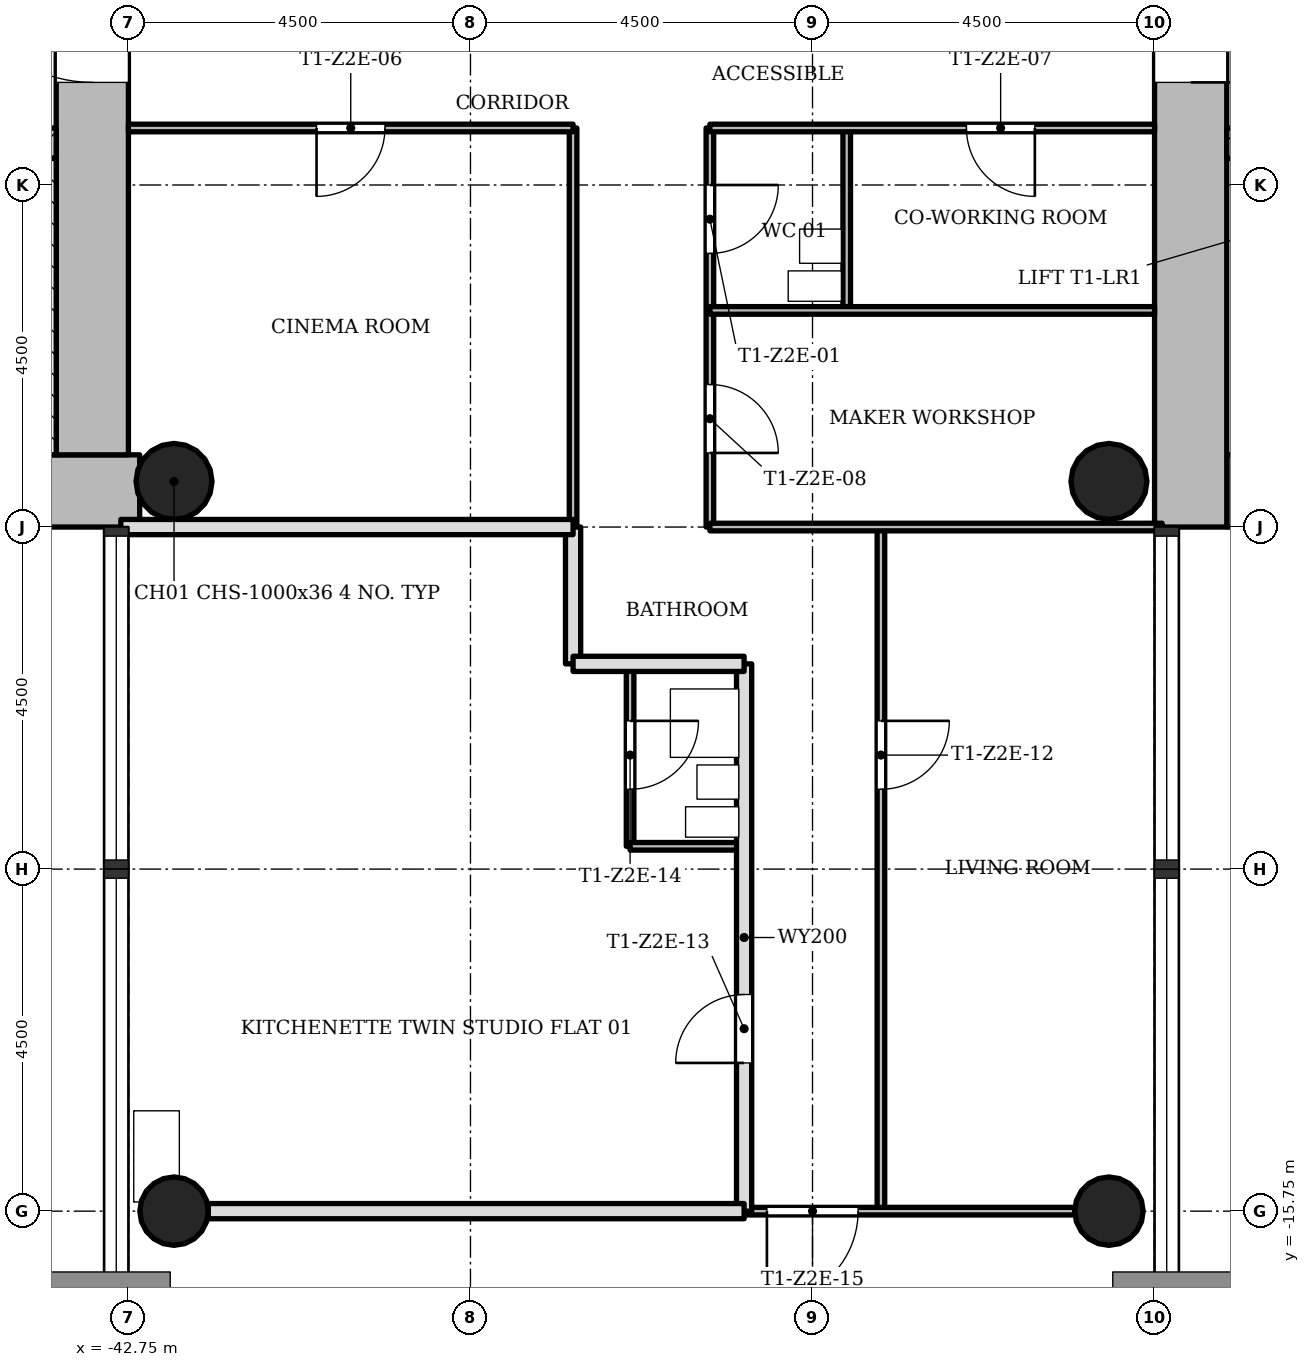
"""IFC4 building model, lengths in metres.
Left out: names, types, materials, properties, quantities, classifications, styles, units other than length and angle.
Written with IfcOpenShell. Run it as: python <this file> out.ifc"""

import sys

from ifc_helpers import new_model, si_unit, direction, frame, frame_2d, origin, origin_2d, place, context, subcontext, project, spatial, rectangle, hollow_circle, extrude, element, fill, save


model = new_model("IFC4")
c1 = context("Model", 3, precision=1e-05, world=origin(), true_north=direction((0.0, 1.0)))
c2 = subcontext(c1, "Body", "Model", "MODEL_VIEW")
j1 = project(units=[si_unit("LENGTHUNIT", "METRE"), si_unit("PLANEANGLEUNIT", "RADIAN")], contexts=[c1])
p1 = place(None, origin())
s1 = spatial("IfcSite", under=j1, at=p1, CompositionType="ELEMENT")
p2 = place(p1, origin())
s2 = spatial("IfcBuilding", under=s1, at=p2, CompositionType="ELEMENT")
p3 = place(p2, frame((0.0, 0.0, 100.4)))
s3 = spatial("IfcBuildingStorey", under=s2, at=p3, CompositionType="ELEMENT", Elevation=100.4)
p4 = place(p3, frame((-28.3, -6.275, 0.0), z_axis=(0.0, 0.0, 1.0), x_axis=(1.0, 0.0, 0.0)))
e1 = element("IfcWall", 1, at=p4, inside=s3, PredefinedType="SHEAR", context=c2, shape_type="SweptSolid", body=[
    extrude(rectangle(XDim=8.05, YDim=0.95, at=frame_2d((4.025, 0.0))), origin(), (0.0, 0.0, 1.0), 3.4),
])
p5 = place(p3, frame((-28.775, 5.8, 0.0), z_axis=(0.0, 0.0, 1.0), x_axis=(0.0, -1.0, 0.0)))
e2 = element("IfcWall", 2, at=p5, inside=s3, PredefinedType="SHEAR", context=c2, shape_type="SweptSolid", body=[
    extrude(rectangle(XDim=12.55, YDim=0.95, at=frame_2d((6.275, 0.0))), origin(), (0.0, 0.0, 1.0), 3.4),
])
p6 = place(p5, frame((4.9, 0.0, 0.0)))
e3 = element("IfcOpeningElement", 3, at=p6, cuts=e2, PredefinedType="OPENING", context=c2, shape_type="SweptSolid", body=[
    extrude(rectangle(XDim=1.8, YDim=2.1, at=frame_2d((0.9, 1.05))), frame((0.0, 0.485, 0.0), z_axis=(0.0, -1.0, 0.0), x_axis=(1.0, 0.0, 0.0)), (0.0, 0.0, 1.0), 0.97),
])
p7 = place(p3, frame((-28.3, -1.7, 0.0), z_axis=(0.0, 0.0, 1.0), x_axis=(1.0, 0.0, 0.0)))
e4 = element("IfcWall", 4, at=p7, inside=s3, PredefinedType="SHEAR", context=c2, shape_type="SweptSolid", body=[
    extrude(rectangle(XDim=7.1, YDim=0.4, at=frame_2d((3.55, 0.0))), origin(), (0.0, 0.0, 1.0), 3.4),
])
p8 = place(p7, frame((0.8, 0.0, 0.0)))
e5 = element("IfcOpeningElement", 5, at=p8, cuts=e4, PredefinedType="OPENING", context=c2, shape_type="SweptSolid", body=[
    extrude(rectangle(XDim=1.1, YDim=2.1, at=frame_2d((0.55, 1.05))), frame((0.0, 0.21, 0.0), z_axis=(0.0, -1.0, 0.0), x_axis=(1.0, 0.0, 0.0)), (0.0, 0.0, 1.0), 0.42),
])
p9 = place(p7, frame((3.0, 0.0, 0.0)))
e6 = element("IfcOpeningElement", 6, at=p9, cuts=e4, PredefinedType="OPENING", context=c2, shape_type="SweptSolid", body=[
    extrude(rectangle(XDim=1.1, YDim=2.1, at=frame_2d((0.55, 1.05))), frame((0.0, 0.21, 0.0), z_axis=(0.0, -1.0, 0.0), x_axis=(1.0, 0.0, 0.0)), (0.0, 0.0, 1.0), 0.42),
])
p10 = place(p7, frame((5.2, 0.0, 0.0)))
e7 = element("IfcOpeningElement", 7, at=p10, cuts=e4, PredefinedType="OPENING", context=c2, shape_type="SweptSolid", body=[
    extrude(rectangle(XDim=1.1, YDim=2.1, at=frame_2d((0.55, 1.05))), frame((0.0, 0.21, 0.0), z_axis=(0.0, -1.0, 0.0), x_axis=(1.0, 0.0, 0.0)), (0.0, 0.0, 1.0), 0.42),
])
p11 = place(p3, frame((-51.298, -6.275, 0.0), z_axis=(0.0, 0.0, 1.0), x_axis=(1.0, 0.0, 0.0)))
e8 = element("IfcWall", 8, at=p11, inside=s3, PredefinedType="SHEAR", context=c2, shape_type="SweptSolid", body=[
    extrude(rectangle(XDim=8.696, YDim=0.95, at=frame_2d((4.348, 0.0))), origin(), (0.0, 0.0, 1.0), 3.4),
])
p12 = place(p3, frame((-43.225, -5.8, 0.0), z_axis=(0.0, 0.0, 1.0), x_axis=(0.0, 1.0, 0.0)))
e9 = element("IfcWall", 9, at=p12, inside=s3, PredefinedType="SHEAR", context=c2, shape_type="SweptSolid", body=[
    extrude(rectangle(XDim=12.55, YDim=0.95, at=frame_2d((6.275, 0.0))), origin(), (0.0, 0.0, 1.0), 3.4),
])
p13 = place(p12, frame((4.9, 0.0, 0.0)))
e10 = element("IfcOpeningElement", 10, at=p13, cuts=e9, PredefinedType="OPENING", context=c2, shape_type="SweptSolid", body=[
    extrude(rectangle(XDim=1.8, YDim=2.1, at=frame_2d((0.9, 1.05))), frame((0.0, 0.485, 0.0), z_axis=(0.0, -1.0, 0.0), x_axis=(1.0, 0.0, 0.0)), (0.0, 0.0, 1.0), 0.97),
])
p14 = place(p3, frame((-50.8, -1.7, 0.0), z_axis=(0.0, 0.0, 1.0), x_axis=(1.0, 0.0, 0.0)))
e11 = element("IfcWall", 11, at=p14, inside=s3, PredefinedType="SHEAR", context=c2, shape_type="SweptSolid", body=[
    extrude(rectangle(XDim=7.1, YDim=0.4, at=frame_2d((3.55, 0.0))), origin(), (0.0, 0.0, 1.0), 3.4),
])
p15 = place(p14, frame((5.5, 0.0, 0.0)))
e12 = element("IfcOpeningElement", 12, at=p15, cuts=e11, PredefinedType="OPENING", context=c2, shape_type="SweptSolid", body=[
    extrude(rectangle(XDim=0.9, YDim=2.1, at=frame_2d((0.45, 1.05))), frame((0.0, 0.21, 0.0), z_axis=(0.0, -1.0, 0.0), x_axis=(1.0, 0.0, 0.0)), (0.0, 0.0, 1.0), 0.42),
])
for number, where, z_axis, x_axis in (
    (13, (-42.15, -15.75, 0.0), (0.0, 0.0, 1.0), (1.0, 0.0, 0.0)),
    (14, (-29.85, -15.75, 0.0), (0.0, 0.0, 1.0), (1.0, 0.0, 0.0)),
):
    element("IfcColumn", number, at=place(p3, frame(where, z_axis=z_axis, x_axis=x_axis)), inside=s3, PredefinedType="COLUMN", context=c2, shape_type="SweptSolid", body=[
        extrude(hollow_circle(Radius=0.45, WallThickness=0.032, at=origin_2d()), origin(), (0.0, 0.0, 1.0), 3.4),
    ])
for number, where, z_axis, x_axis in (
    (15, (-42.15, -6.15, 0.0), (0.0, 0.0, 1.0), (1.0, 0.0, 0.0)),
    (16, (-29.85, -6.15, 0.0), (0.0, 0.0, 1.0), (1.0, 0.0, 0.0)),
):
    element("IfcColumn", number, at=place(p3, frame(where, z_axis=z_axis, x_axis=x_axis)), inside=s3, PredefinedType="COLUMN", context=c2, shape_type="SweptSolid", body=[
        extrude(hollow_circle(Radius=0.5, WallThickness=0.036, at=origin_2d()), origin(), (0.0, 0.0, 1.0), 3.4),
    ])
p16 = place(p3, frame((-36.9, -6.75, 0.0), z_axis=(0.0, 0.0, 1.0), x_axis=(0.0, 1.0, 0.0)))
e17 = element("IfcWall", 17, at=p16, inside=s3, PredefinedType="PARTITIONING", context=c2, shape_type="SweptSolid", body=[
    extrude(rectangle(XDim=5.25, YDim=0.1, at=frame_2d((2.625, 0.0))), origin(), (0.0, 0.0, 1.0), 3.0),
])
p17 = place(p3, frame((-36.9, -8.55, 0.0), z_axis=(0.0, 0.0, 1.0), x_axis=(0.0, 1.0, 0.0)))
e18 = element("IfcWall", 18, at=p17, inside=s3, PredefinedType="SOLIDWALL", context=c2, shape_type="SweptSolid", body=[
    extrude(rectangle(XDim=1.8, YDim=0.2, at=frame_2d((0.9, 0.0))), origin(), (0.0, 0.0, 1.0), 3.0),
])
p18 = place(p3, frame((-36.15, -10.95, 0.0), z_axis=(0.0, 0.0, 1.0), x_axis=(0.0, 1.0, 0.0)))
e19 = element("IfcWall", 19, at=p18, inside=s3, PredefinedType="PARTITIONING", context=c2, shape_type="SweptSolid", body=[
    extrude(rectangle(XDim=2.4, YDim=0.1, at=frame_2d((1.2, 0.0))), origin(), (0.0, 0.0, 1.0), 3.0),
])
p19 = place(p18, frame((0.75, 0.0, 0.0)))
e20 = element("IfcOpeningElement", 20, at=p19, cuts=e19, PredefinedType="OPENING", context=c2, shape_type="SweptSolid", body=[
    extrude(rectangle(XDim=0.9, YDim=2.1, at=frame_2d((0.45, 1.05))), frame((0.0, 0.06, 0.0), z_axis=(0.0, -1.0, 0.0), x_axis=(1.0, 0.0, 0.0)), (0.0, 0.0, 1.0), 0.12),
])
p20 = place(p3, frame((-35.1, -6.75, 0.0), z_axis=(0.0, 0.0, 1.0), x_axis=(0.0, 1.0, 0.0)))
e21 = element("IfcWall", 21, at=p20, inside=s3, PredefinedType="PARTITIONING", context=c2, shape_type="SweptSolid", body=[
    extrude(rectangle(XDim=5.25, YDim=0.1, at=frame_2d((2.625, 0.0))), origin(), (0.0, 0.0, 1.0), 3.0),
])
p21 = place(p20, frame((3.6, 0.0, 0.0)))
e22 = element("IfcOpeningElement", 22, at=p21, cuts=e21, PredefinedType="OPENING", context=c2, shape_type="SweptSolid", body=[
    extrude(rectangle(XDim=0.9, YDim=2.1, at=frame_2d((0.45, 1.05))), frame((0.0, 0.06, 0.0), z_axis=(0.0, -1.0, 0.0), x_axis=(1.0, 0.0, 0.0)), (0.0, 0.0, 1.0), 0.12),
])
p22 = place(p20, frame((0.975, 0.0, 0.0)))
e23 = element("IfcOpeningElement", 23, at=p22, cuts=e21, PredefinedType="OPENING", context=c2, shape_type="SweptSolid", body=[
    extrude(rectangle(XDim=0.9, YDim=2.1, at=frame_2d((0.45, 1.05))), frame((0.0, 0.06, 0.0), z_axis=(0.0, -1.0, 0.0), x_axis=(1.0, 0.0, 0.0)), (0.0, 0.0, 1.0), 0.12),
])
p23 = place(p3, frame((-34.65, -15.75, 0.0), z_axis=(0.0, 0.0, 1.0), x_axis=(0.0, 1.0, 0.0)))
e24 = element("IfcWall", 24, at=p23, inside=s3, PredefinedType="SOLIDWALL", context=c2, shape_type="SweptSolid", body=[
    extrude(rectangle(XDim=7.2, YDim=0.2, at=frame_2d((3.6, 0.0))), origin(), (0.0, 0.0, 1.0), 3.0),
])
p24 = place(p23, frame((1.95, 0.0, 0.0)))
e25 = element("IfcOpeningElement", 25, at=p24, cuts=e24, PredefinedType="OPENING", context=c2, shape_type="SweptSolid", body=[
    extrude(rectangle(XDim=0.9, YDim=2.1, at=frame_2d((0.45, 1.05))), frame((0.0, 0.11, 0.0), z_axis=(0.0, -1.0, 0.0), x_axis=(1.0, 0.0, 0.0)), (0.0, 0.0, 1.0), 0.22),
])
p25 = place(p3, frame((-33.3, -3.9, 0.0), z_axis=(0.0, 0.0, 1.0), x_axis=(0.0, 1.0, 0.0)))
e26 = element("IfcWall", 26, at=p25, inside=s3, PredefinedType="PARTITIONING", context=c2, shape_type="SweptSolid", body=[
    extrude(rectangle(XDim=2.4, YDim=0.1, at=frame_2d((1.2, 0.0))), origin(), (0.0, 0.0, 1.0), 3.0),
])
p26 = place(p3, frame((-32.85, -15.75, 0.0), z_axis=(0.0, 0.0, 1.0), x_axis=(0.0, 1.0, 0.0)))
e27 = element("IfcWall", 27, at=p26, inside=s3, PredefinedType="PARTITIONING", context=c2, shape_type="SweptSolid", body=[
    extrude(rectangle(XDim=9.0, YDim=0.1, at=frame_2d((4.5, 0.0))), origin(), (0.0, 0.0, 1.0), 3.0),
])
p27 = place(p26, frame((5.55, 0.0, 0.0)))
e28 = element("IfcOpeningElement", 28, at=p27, cuts=e27, PredefinedType="OPENING", context=c2, shape_type="SweptSolid", body=[
    extrude(rectangle(XDim=0.9, YDim=2.1, at=frame_2d((0.45, 1.05))), frame((0.0, 0.06, 0.0), z_axis=(0.0, -1.0, 0.0), x_axis=(1.0, 0.0, 0.0)), (0.0, 0.0, 1.0), 0.12),
])
p28 = place(p3, frame((-34.65, -15.75, 0.0), z_axis=(0.0, 0.0, 1.0), x_axis=(1.0, 0.0, 0.0)))
e29 = element("IfcWall", 29, at=p28, inside=s3, PredefinedType="PARTITIONING", context=c2, shape_type="SweptSolid", body=[
    extrude(rectangle(XDim=4.35, YDim=0.1, at=frame_2d((2.175, 0.0))), origin(), (0.0, 0.0, 1.0), 3.0),
])
p29 = place(p28, frame((0.3, 0.0, 0.0)))
e30 = element("IfcOpeningElement", 30, at=p29, cuts=e29, PredefinedType="OPENING", context=c2, shape_type="SweptSolid", body=[
    extrude(rectangle(XDim=1.2, YDim=2.1, at=frame_2d((0.6, 1.05))), frame((0.0, 0.06, 0.0), z_axis=(0.0, -1.0, 0.0), x_axis=(1.0, 0.0, 0.0)), (0.0, 0.0, 1.0), 0.12),
])
p30 = place(p3, frame((-41.7, -15.75, 0.0), z_axis=(0.0, 0.0, 1.0), x_axis=(1.0, 0.0, 0.0)))
e31 = element("IfcWall", 31, at=p30, inside=s3, PredefinedType="SOLIDWALL", context=c2, shape_type="SweptSolid", body=[
    extrude(rectangle(XDim=7.05, YDim=0.2, at=frame_2d((3.525, 0.0))), origin(), (0.0, 0.0, 1.0), 3.0),
])
p31 = place(p3, frame((-36.15, -10.95, 0.0), z_axis=(0.0, 0.0, 1.0), x_axis=(1.0, 0.0, 0.0)))
e32 = element("IfcWall", 32, at=p31, inside=s3, PredefinedType="PARTITIONING", context=c2, shape_type="SweptSolid", body=[
    extrude(rectangle(XDim=1.5, YDim=0.1, at=frame_2d((0.75, 0.0))), origin(), (0.0, 0.0, 1.0), 3.0),
])
p32 = place(p3, frame((-36.9, -8.55, 0.0), z_axis=(0.0, 0.0, 1.0), x_axis=(1.0, 0.0, 0.0)))
e33 = element("IfcWall", 33, at=p32, inside=s3, PredefinedType="SOLIDWALL", context=c2, shape_type="SweptSolid", body=[
    extrude(rectangle(XDim=2.25, YDim=0.2, at=frame_2d((1.125, 0.0))), origin(), (0.0, 0.0, 1.0), 3.0),
])
p33 = place(p3, frame((-35.1, -6.75, 0.0), z_axis=(0.0, 0.0, 1.0), x_axis=(1.0, 0.0, 0.0)))
e34 = element("IfcWall", 34, at=p33, inside=s3, PredefinedType="PARTITIONING", context=c2, shape_type="SweptSolid", body=[
    extrude(rectangle(XDim=5.95, YDim=0.1, at=frame_2d((2.975, 0.0))), origin(), (0.0, 0.0, 1.0), 3.0),
])
p34 = place(p3, frame((-42.85, -6.75, 0.0), z_axis=(0.0, 0.0, 1.0), x_axis=(1.0, 0.0, 0.0)))
e35 = element("IfcWall", 35, at=p34, inside=s3, PredefinedType="SOLIDWALL", context=c2, shape_type="SweptSolid", body=[
    extrude(rectangle(XDim=5.95, YDim=0.2, at=frame_2d((2.975, 0.0))), origin(), (0.0, 0.0, 1.0), 3.0),
])
p35 = place(p3, frame((-35.1, -3.9, 0.0), z_axis=(0.0, 0.0, 1.0), x_axis=(1.0, 0.0, 0.0)))
e36 = element("IfcWall", 36, at=p35, inside=s3, PredefinedType="PARTITIONING", context=c2, shape_type="SweptSolid", body=[
    extrude(rectangle(XDim=5.85, YDim=0.1, at=frame_2d((2.925, 0.0))), origin(), (0.0, 0.0, 1.0), 3.0),
])
p36 = place(p3, frame((-42.75, -1.5, 0.0), z_axis=(0.0, 0.0, 1.0), x_axis=(1.0, 0.0, 0.0)))
e37 = element("IfcWall", 37, at=p36, inside=s3, PredefinedType="PARTITIONING", context=c2, shape_type="SweptSolid", body=[
    extrude(rectangle(XDim=5.85, YDim=0.1, at=frame_2d((2.925, 0.0))), origin(), (0.0, 0.0, 1.0), 3.0),
])
p37 = place(p36, frame((2.475, 0.0, 0.0)))
e38 = element("IfcOpeningElement", 38, at=p37, cuts=e37, PredefinedType="OPENING", context=c2, shape_type="SweptSolid", body=[
    extrude(rectangle(XDim=0.9, YDim=2.1, at=frame_2d((0.45, 1.05))), frame((0.0, 0.06, 0.0), z_axis=(0.0, -1.0, 0.0), x_axis=(1.0, 0.0, 0.0)), (0.0, 0.0, 1.0), 0.12),
])
p38 = place(p3, frame((-35.1, -1.5, 0.0), z_axis=(0.0, 0.0, 1.0), x_axis=(1.0, 0.0, 0.0)))
e39 = element("IfcWall", 39, at=p38, inside=s3, PredefinedType="PARTITIONING", context=c2, shape_type="SweptSolid", body=[
    extrude(rectangle(XDim=5.85, YDim=0.1, at=frame_2d((2.925, 0.0))), origin(), (0.0, 0.0, 1.0), 3.0),
])
p39 = place(p38, frame((3.375, 0.0, 0.0)))
e40 = element("IfcOpeningElement", 40, at=p39, cuts=e39, PredefinedType="OPENING", context=c2, shape_type="SweptSolid", body=[
    extrude(rectangle(XDim=0.9, YDim=2.1, at=frame_2d((0.45, 1.05))), frame((0.0, 0.06, 0.0), z_axis=(0.0, -1.0, 0.0), x_axis=(1.0, 0.0, 0.0)), (0.0, 0.0, 1.0), 0.12),
])
p40 = place(p3, frame((-43.825, -1.9, 0.0), z_axis=(0.0, 0.0, 1.0), x_axis=(0.0, -1.0, 0.0)))
e41 = element("IfcWall", 41, at=p40, inside=s3, PredefinedType="SHEAR", context=c2, shape_type="SweptSolid", body=[
    extrude(rectangle(XDim=3.9, YDim=0.25, at=frame_2d((1.95, 0.0))), origin(), (0.0, 0.0, 1.0), 3.4),
])
p41 = place(p21, origin())
e42 = element("IfcDoor", 42, at=p41, inside=s3, OperationType="SINGLE_SWING_RIGHT", PredefinedType="DOOR", context=c2, shape_type="SweptSolid", body=[
    extrude(rectangle(XDim=0.9, YDim=2.1, at=frame_2d((0.45, 1.05))), frame((0.0, 0.025, 0.0), z_axis=(0.0, -1.0, 0.0), x_axis=(1.0, 0.0, 0.0)), (0.0, 0.0, 1.0), 0.05),
])
fill(e22, e42)
p42 = place(p37, origin())
e43 = element("IfcDoor", 43, at=p42, inside=s3, OperationType="SINGLE_SWING_LEFT", PredefinedType="DOOR", context=c2, shape_type="SweptSolid", body=[
    extrude(rectangle(XDim=0.9, YDim=2.1, at=frame_2d((0.45, 1.05))), frame((0.0, 0.025, 0.0), z_axis=(0.0, -1.0, 0.0), x_axis=(1.0, 0.0, 0.0)), (0.0, 0.0, 1.0), 0.05),
])
fill(e38, e43)
p43 = place(p39, origin())
e44 = element("IfcDoor", 44, at=p43, inside=s3, OperationType="SINGLE_SWING_RIGHT", PredefinedType="DOOR", context=c2, shape_type="SweptSolid", body=[
    extrude(rectangle(XDim=0.9, YDim=2.1, at=frame_2d((0.45, 1.05))), frame((0.0, 0.025, 0.0), z_axis=(0.0, -1.0, 0.0), x_axis=(1.0, 0.0, 0.0)), (0.0, 0.0, 1.0), 0.05),
])
fill(e40, e44)
p44 = place(p22, origin())
e45 = element("IfcDoor", 45, at=p44, inside=s3, OperationType="SINGLE_SWING_LEFT", PredefinedType="DOOR", context=c2, shape_type="SweptSolid", body=[
    extrude(rectangle(XDim=0.9, YDim=2.1, at=frame_2d((0.45, 1.05))), frame((0.0, 0.025, 0.0), z_axis=(0.0, -1.0, 0.0), x_axis=(1.0, 0.0, 0.0)), (0.0, 0.0, 1.0), 0.05),
])
fill(e23, e45)
p45 = place(p27, origin())
e46 = element("IfcDoor", 46, at=p45, inside=s3, OperationType="SINGLE_SWING_RIGHT", PredefinedType="DOOR", context=c2, shape_type="SweptSolid", body=[
    extrude(rectangle(XDim=0.9, YDim=2.1, at=frame_2d((0.45, 1.05))), frame((0.0, 0.025, 0.0), z_axis=(0.0, -1.0, 0.0), x_axis=(1.0, 0.0, 0.0)), (0.0, 0.0, 1.0), 0.05),
])
fill(e28, e46)
p46 = place(p24, origin())
e47 = element("IfcDoor", 47, at=p46, inside=s3, OperationType="SINGLE_SWING_RIGHT", PredefinedType="DOOR", context=c2, shape_type="SweptSolid", body=[
    extrude(rectangle(XDim=0.9, YDim=2.1, at=frame_2d((0.45, 1.05))), frame((0.0, 0.025, 0.0), z_axis=(0.0, -1.0, 0.0), x_axis=(1.0, 0.0, 0.0)), (0.0, 0.0, 1.0), 0.05),
])
fill(e25, e47)
p47 = place(p19, origin())
e48 = element("IfcDoor", 48, at=p47, inside=s3, OperationType="SINGLE_SWING_RIGHT", PredefinedType="DOOR", context=c2, shape_type="SweptSolid", body=[
    extrude(rectangle(XDim=0.9, YDim=2.1, at=frame_2d((0.45, 1.05))), frame((0.0, 0.025, 0.0), z_axis=(0.0, -1.0, 0.0), x_axis=(1.0, 0.0, 0.0)), (0.0, 0.0, 1.0), 0.05),
])
fill(e20, e48)
p48 = place(p29, origin())
e49 = element("IfcDoor", 49, at=p48, inside=s3, OperationType="SINGLE_SWING_LEFT", PredefinedType="DOOR", context=c2, shape_type="SweptSolid", body=[
    extrude(rectangle(XDim=1.2, YDim=2.1, at=frame_2d((0.6, 1.05))), frame((0.0, 0.025, 0.0), z_axis=(0.0, -1.0, 0.0), x_axis=(1.0, 0.0, 0.0)), (0.0, 0.0, 1.0), 0.05),
])
fill(e30, e49)
p49 = place(p6, origin())
e50 = element("IfcDoor", 50, at=p49, inside=s3, OperationType="SINGLE_SWING_LEFT", PredefinedType="DOOR", context=c2, shape_type="SweptSolid", body=[
    extrude(rectangle(XDim=1.8, YDim=2.1, at=frame_2d((0.9, 1.05))), frame((0.0, 0.025, 0.0), z_axis=(0.0, -1.0, 0.0), x_axis=(1.0, 0.0, 0.0)), (0.0, 0.0, 1.0), 0.05),
])
fill(e3, e50)
p50 = place(p13, origin())
e51 = element("IfcDoor", 51, at=p50, inside=s3, OperationType="SINGLE_SWING_LEFT", PredefinedType="DOOR", context=c2, shape_type="SweptSolid", body=[
    extrude(rectangle(XDim=1.8, YDim=2.1, at=frame_2d((0.9, 1.05))), frame((0.0, 0.025, 0.0), z_axis=(0.0, -1.0, 0.0), x_axis=(1.0, 0.0, 0.0)), (0.0, 0.0, 1.0), 0.05),
])
fill(e10, e51)
save(model, sys.argv[1])
